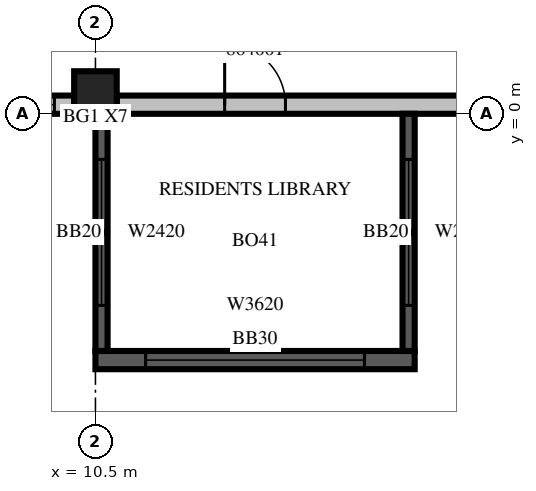
"""IFC4 building model, lengths in metres.
Left out: names, types, materials, properties, quantities, classifications, styles, units other than length and angle.
Written with IfcOpenShell. Run it as: python <this file> out.ifc"""

import sys

from ifc_helpers import new_model, si_unit, direction, frame, frame_2d, origin, origin_2d, place, context, subcontext, project, spatial, rectangle, extrude, source, transform, mapped, element, fill, save


model = new_model("IFC4")
c1 = context("Model", 3, precision=1e-05, world=origin(), true_north=direction((0.0, 1.0)))
c2 = subcontext(c1, "Body", "Model", "MODEL_VIEW")
j1 = project(units=[si_unit("LENGTHUNIT", "METRE"), si_unit("PLANEANGLEUNIT", "RADIAN")], contexts=[c1])
p1 = place(None, origin())
s1 = spatial("IfcSite", under=j1, at=p1, CompositionType="ELEMENT")
p2 = place(p1, origin())
s2 = spatial("IfcBuilding", under=s1, at=p2, CompositionType="ELEMENT")
p3 = place(p2, frame((0.0, 0.0, 284.5)))
s3 = spatial("IfcBuildingStorey", under=s2, at=p3, CompositionType="ELEMENT", Elevation=284.5)
p4 = place(p3, frame((10.5, 0.35, 0.0), z_axis=(0.0, 0.0, 1.0), x_axis=(1.0, 0.0, 0.0)))
e1 = element("IfcColumn", 1, at=p4, inside=s3, PredefinedType="COLUMN", context=c2, shape_type="SweptSolid", body=[
    extrude(rectangle(XDim=0.7, YDim=0.7, at=origin_2d()), origin(), (0.0, 0.0, 1.0), 3.5),
])
p5 = place(p3, frame((7.35, 0.15, 0.0), z_axis=(0.0, 0.0, 1.0), x_axis=(1.0, 0.0, 0.0)))
e2 = element("IfcWall", 2, at=p5, inside=s3, PredefinedType="STANDARD", context=c2, shape_type="SweptSolid", body=[
    extrude(rectangle(XDim=2.8, YDim=0.3, at=frame_2d((1.4, 0.0))), origin(), (0.0, 0.0, 1.0), 3.1),
])
p6 = place(p5, frame((0.675, 0.0, 0.6)))
e3 = element("IfcOpeningElement", 3, at=p6, cuts=e2, PredefinedType="OPENING", context=c2, shape_type="SweptSolid", body=[
    extrude(rectangle(XDim=1.8, YDim=2.0, at=frame_2d((0.9, 1.0))), frame((0.0, 0.16, 0.0), z_axis=(0.0, -1.0, 0.0), x_axis=(1.0, 0.0, 0.0)), (0.0, 0.0, 1.0), 0.32),
])
p7 = place(p3, frame((10.85, 0.15, 0.0), z_axis=(0.0, 0.0, 1.0), x_axis=(1.0, 0.0, 0.0)))
e4 = element("IfcWall", 4, at=p7, inside=s3, PredefinedType="STANDARD", context=c2, shape_type="SweptSolid", body=[
    extrude(rectangle(XDim=9.8, YDim=0.3, at=frame_2d((4.9, 0.0))), origin(), (0.0, 0.0, 1.0), 3.1),
])
p8 = place(p7, frame((5.725, 0.0, 0.6)))
e5 = element("IfcOpeningElement", 5, at=p8, cuts=e4, PredefinedType="OPENING", context=c2, shape_type="SweptSolid", body=[
    extrude(rectangle(XDim=3.6, YDim=2.0, at=frame_2d((1.8, 1.0))), frame((0.0, 0.16, 0.0), z_axis=(0.0, -1.0, 0.0), x_axis=(1.0, 0.0, 0.0)), (0.0, 0.0, 1.0), 0.32),
])
m1 = source(origin(), c2, "Body", "SweptSolid", [
    extrude(rectangle(XDim=1.0, YDim=2.1, at=frame_2d((0.5, 1.05))), frame((0.0, 0.16, 0.0), z_axis=(0.0, -1.0, 0.0), x_axis=(1.0, 0.0, 0.0)), (0.0, 0.0, 1.0), 0.32),
])
p9 = place(p7, frame((1.775, 0.0, 0.0)))
e6 = element("IfcOpeningElement", 6, at=p9, cuts=e4, PredefinedType="OPENING", context=c2, shape_type="MappedRepresentation", body=[
    mapped(m1, transform((0.0, 0.0, 0.0), scale=1.0)),
])
p10 = place(p3, frame((10.5, -4.05, 0.0), z_axis=(0.0, 0.0, 1.0), x_axis=(1.0, 0.0, 0.0)))
e7 = element("IfcWall", 7, at=p10, inside=s3, PredefinedType="SOLIDWALL", context=c2, shape_type="SweptSolid", body=[
    extrude(rectangle(XDim=5.25, YDim=0.3, at=frame_2d((2.625, 0.0))), origin(), (0.0, 0.0, 1.0), 3.09),
])
m2 = source(origin(), c2, "Body", "SweptSolid", [
    extrude(rectangle(XDim=3.6, YDim=2.0, at=frame_2d((1.8, 1.0))), frame((0.0, 0.16, 0.0), z_axis=(0.0, -1.0, 0.0), x_axis=(1.0, 0.0, 0.0)), (0.0, 0.0, 1.0), 0.32),
])
p11 = place(p10, frame((0.825, 0.0, 0.6)))
e8 = element("IfcOpeningElement", 8, at=p11, cuts=e7, PredefinedType="OPENING", context=c2, shape_type="MappedRepresentation", body=[
    mapped(m2, transform((0.0, 0.0, 0.0), scale=1.0)),
])
p12 = place(p3, frame((10.6, 0.0, 0.0), z_axis=(0.0, 0.0, 1.0), x_axis=(0.0, -1.0, 0.0)))
e9 = element("IfcWall", 9, at=p12, inside=s3, PredefinedType="SOLIDWALL", context=c2, shape_type="SweptSolid", body=[
    extrude(rectangle(XDim=3.9, YDim=0.2, at=frame_2d((1.95, 0.0))), origin(), (0.0, 0.0, 1.0), 3.09),
])
p13 = place(p12, frame((0.75, 0.0, 0.6)))
e10 = element("IfcOpeningElement", 10, at=p13, cuts=e9, PredefinedType="OPENING", context=c2, shape_type="SweptSolid", body=[
    extrude(rectangle(XDim=2.4, YDim=2.0, at=frame_2d((1.2, 1.0))), frame((0.0, 0.11, 0.0), z_axis=(0.0, -1.0, 0.0), x_axis=(1.0, 0.0, 0.0)), (0.0, 0.0, 1.0), 0.22),
])
m3 = source(origin(), c2, "Body", "SweptSolid", [
    extrude(rectangle(XDim=3.9, YDim=0.2, at=frame_2d((1.95, 0.0))), origin(), (0.0, 0.0, 1.0), 3.09),
])
p14 = place(p3, frame((15.65, 0.0, 0.0), z_axis=(0.0, 0.0, 1.0), x_axis=(0.0, -1.0, 0.0)))
e11 = element("IfcWall", 11, at=p14, inside=s3, PredefinedType="SOLIDWALL", context=c2, shape_type="MappedRepresentation", body=[
    mapped(m3, transform((0.0, 0.0, 0.0), scale=1.0)),
])
m4 = source(origin(), c2, "Body", "SweptSolid", [
    extrude(rectangle(XDim=2.4, YDim=2.0, at=frame_2d((1.2, 1.0))), frame((0.0, 0.11, 0.0), z_axis=(0.0, -1.0, 0.0), x_axis=(1.0, 0.0, 0.0)), (0.0, 0.0, 1.0), 0.22),
])
p15 = place(p14, frame((0.75, 0.0, 0.6)))
e12 = element("IfcOpeningElement", 12, at=p15, cuts=e11, PredefinedType="OPENING", context=c2, shape_type="MappedRepresentation", body=[
    mapped(m4, transform((0.0, 0.0, 0.0), scale=1.0)),
])
p16 = place(p6, origin())
e13 = element("IfcWindow", 13, at=p16, inside=s3, PartitioningType="SINGLE_PANEL", PredefinedType="WINDOW", context=c2, shape_type="SweptSolid", body=[
    extrude(rectangle(XDim=1.8, YDim=2.0, at=frame_2d((0.9, 1.0))), frame((0.0, 0.03, 0.0), z_axis=(0.0, -1.0, 0.0), x_axis=(1.0, 0.0, 0.0)), (0.0, 0.0, 1.0), 0.06),
])
fill(e3, e13)
m5 = source(origin(), c2, "Body", "SweptSolid", [
    extrude(rectangle(XDim=3.6, YDim=2.0, at=frame_2d((1.8, 1.0))), frame((0.0, 0.03, 0.0), z_axis=(0.0, -1.0, 0.0), x_axis=(1.0, 0.0, 0.0)), (0.0, 0.0, 1.0), 0.06),
])
p17 = place(p11, origin())
e14 = element("IfcWindow", 14, at=p17, inside=s3, PartitioningType="SINGLE_PANEL", PredefinedType="WINDOW", context=c2, shape_type="MappedRepresentation", body=[
    mapped(m5, transform((0.0, 0.0, 0.0), scale=1.0)),
])
fill(e8, e14)
m6 = source(origin(), c2, "Body", "SweptSolid", [
    extrude(rectangle(XDim=2.4, YDim=2.0, at=frame_2d((1.2, 1.0))), frame((0.0, 0.03, 0.0), z_axis=(0.0, -1.0, 0.0), x_axis=(1.0, 0.0, 0.0)), (0.0, 0.0, 1.0), 0.06),
])
p18 = place(p13, origin())
e15 = element("IfcWindow", 15, at=p18, inside=s3, PartitioningType="SINGLE_PANEL", PredefinedType="WINDOW", context=c2, shape_type="MappedRepresentation", body=[
    mapped(m6, transform((0.0, 0.0, 0.0), scale=1.0)),
])
fill(e10, e15)
p19 = place(p15, origin())
e16 = element("IfcWindow", 16, at=p19, inside=s3, PartitioningType="SINGLE_PANEL", PredefinedType="WINDOW", context=c2, shape_type="MappedRepresentation", body=[
    mapped(m6, transform((0.0, 0.0, 0.0), scale=1.0)),
])
fill(e12, e16)
m7 = source(origin(), c2, "Body", "SweptSolid", [
    extrude(rectangle(XDim=1.0, YDim=2.1, at=frame_2d((0.5, 1.05))), frame((0.0, 0.025, 0.0), z_axis=(0.0, -1.0, 0.0), x_axis=(1.0, 0.0, 0.0)), (0.0, 0.0, 1.0), 0.05),
])
p20 = place(p9, origin())
e17 = element("IfcDoor", 17, at=p20, inside=s3, OperationType="SINGLE_SWING_LEFT", PredefinedType="DOOR", context=c2, shape_type="MappedRepresentation", body=[
    mapped(m7, transform((0.0, 0.0, 0.0), scale=1.0)),
])
fill(e6, e17)
save(model, sys.argv[1])
